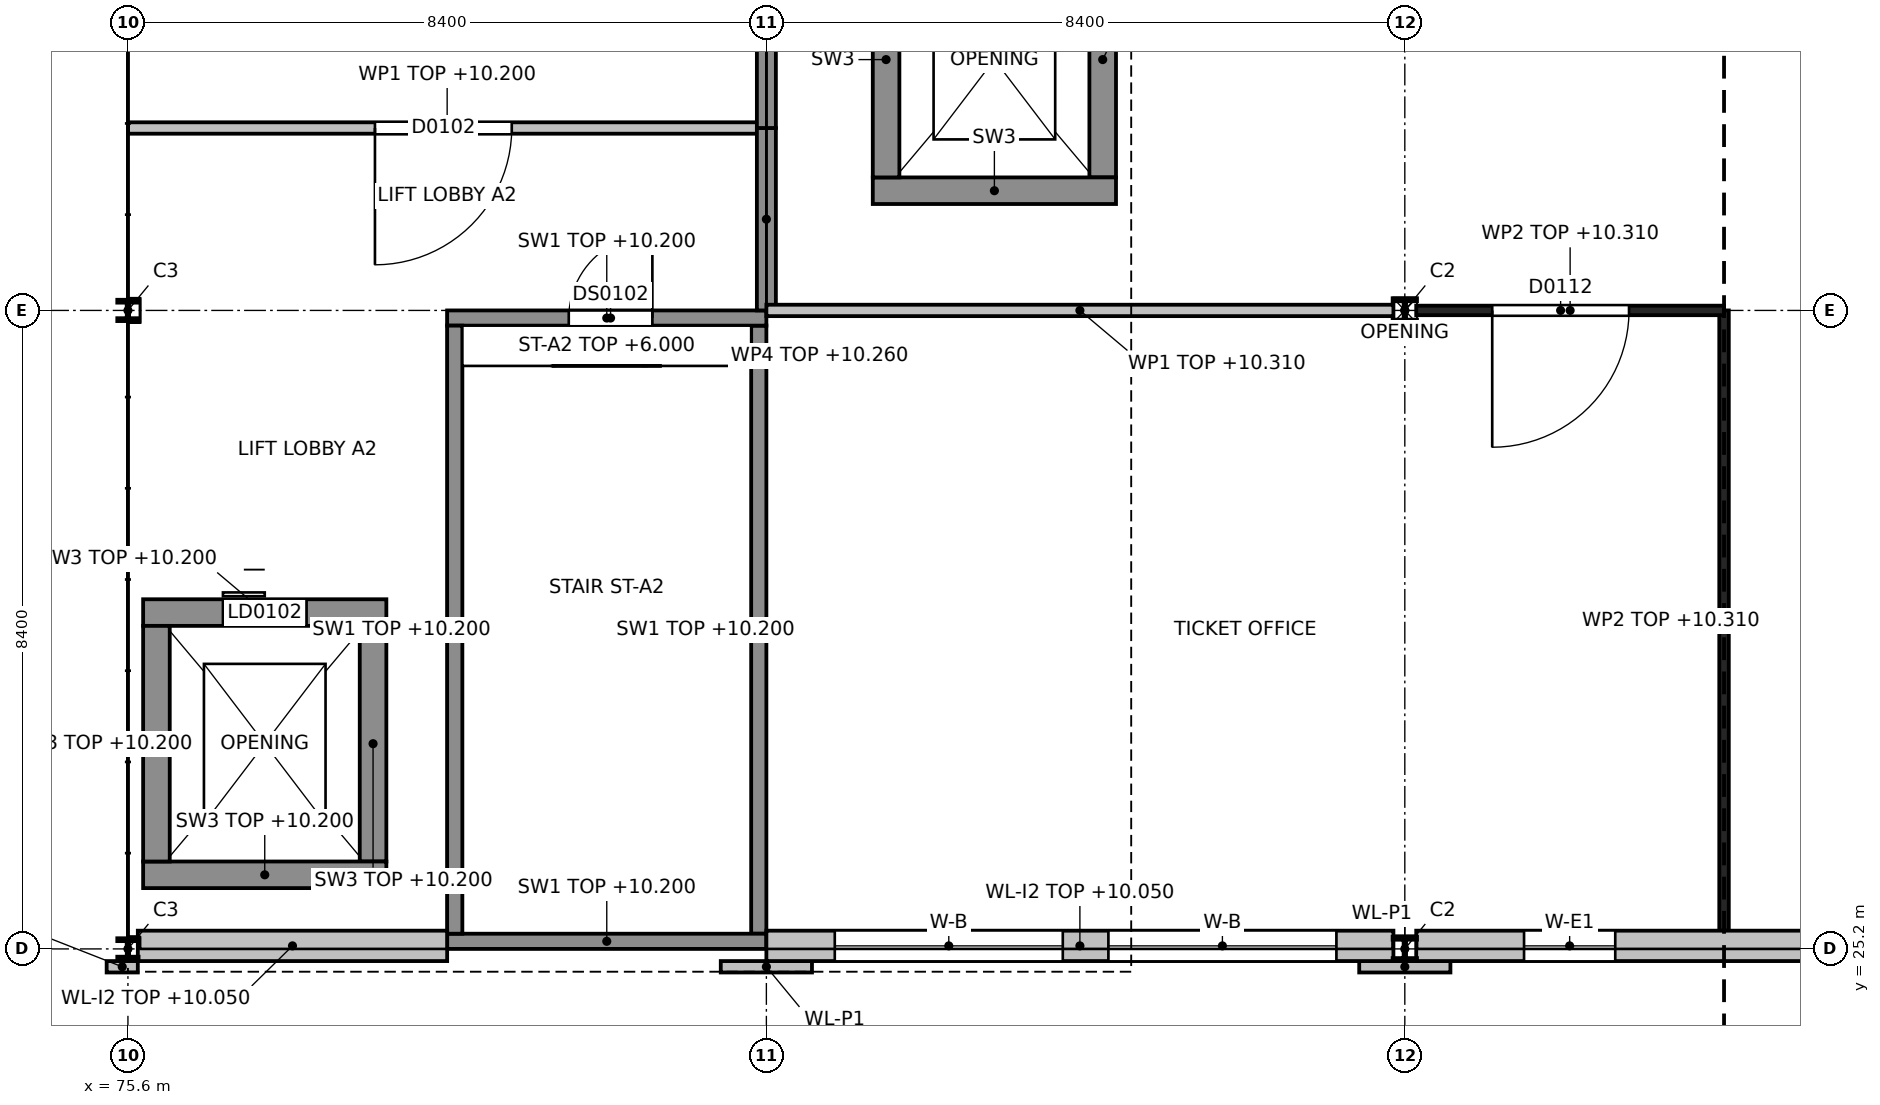
"""IFC4 building model, lengths in metres.
Left out: names, types, materials, properties, quantities, classifications, styles, units other than length and angle.
Written with IfcOpenShell. Run it as: python <this file> out.ifc"""

import sys

from ifc_helpers import new_model, si_unit, direction, frame, frame_2d, origin, origin_2d, place, context, subcontext, project, spatial, rectangle, i_section, extrude, element, fill, save


model = new_model("IFC4")
c1 = context("Model", 3, precision=1e-05, world=origin(), true_north=direction((0.0, 1.0)))
c2 = subcontext(c1, "Body", "Model", "MODEL_VIEW")
j1 = project(units=[si_unit("LENGTHUNIT", "METRE"), si_unit("PLANEANGLEUNIT", "RADIAN")], contexts=[c1])
p1 = place(None, origin())
s1 = spatial("IfcSite", under=j1, at=p1, CompositionType="ELEMENT")
p2 = place(p1, origin())
s2 = spatial("IfcBuilding", under=s1, at=p2, CompositionType="ELEMENT")
p3 = place(p2, frame((0.0, 0.0, 6.0)))
s3 = spatial("IfcBuildingStorey", under=s2, at=p3, CompositionType="ELEMENT", Elevation=6.0)
for number, where, z_axis, x_axis in (
    (1, (75.6, 25.2, 0.0), (0.0, 0.0, 1.0), (1.0, 0.0, 0.0)),
    (2, (75.6, 33.6, 0.0), (0.0, 0.0, 1.0), (1.0, 0.0, 0.0)),
):
    element("IfcColumn", number, at=place(p3, frame(where, z_axis=z_axis, x_axis=x_axis)), inside=s3, PredefinedType="COLUMN", context=c2, shape_type="SweptSolid", body=[
        extrude(i_section(OverallWidth=0.26, OverallDepth=0.26, WebThickness=0.01, FlangeThickness=0.018, at=origin_2d()), origin(), (0.0, 0.0, 1.0), 4.8),
    ])
for number, where, z_axis, x_axis in (
    (3, (92.4, 25.2, 0.0), (0.0, 0.0, 1.0), (1.0, 0.0, 0.0)),
    (4, (92.4, 33.6, 0.0), (0.0, 0.0, 1.0), (1.0, 0.0, 0.0)),
):
    element("IfcColumn", number, at=place(p3, frame(where, z_axis=z_axis, x_axis=x_axis)), inside=s3, PredefinedType="COLUMN", context=c2, shape_type="SweptSolid", body=[
        extrude(i_section(OverallWidth=0.3, OverallDepth=0.3, WebThickness=0.011, FlangeThickness=0.019, at=origin_2d()), origin(), (0.0, 0.0, 1.0), 4.8),
    ])
p4 = place(p3, frame((79.8, 25.3, 0.0), z_axis=(0.0, 0.0, 1.0), x_axis=(1.0, 0.0, 0.0)))
e5 = element("IfcWall", 5, at=p4, inside=s3, PredefinedType="SHEAR", context=c2, shape_type="SweptSolid", body=[
    extrude(rectangle(XDim=4.2, YDim=0.2, at=frame_2d((2.1, 0.0))), origin(), (0.0, 0.0, 1.0), 4.2),
])
p5 = place(p3, frame((79.8, 33.5, 0.0), z_axis=(0.0, 0.0, 1.0), x_axis=(1.0, 0.0, 0.0)))
e6 = element("IfcWall", 6, at=p5, inside=s3, PredefinedType="SHEAR", context=c2, shape_type="SweptSolid", body=[
    extrude(rectangle(XDim=4.2, YDim=0.2, at=frame_2d((2.1, 0.0))), origin(), (0.0, 0.0, 1.0), 4.2),
])
p6 = place(p5, frame((1.6, 0.0, 0.0)))
e7 = element("IfcOpeningElement", 7, at=p6, cuts=e6, PredefinedType="OPENING", context=c2, shape_type="SweptSolid", body=[
    extrude(rectangle(XDim=1.1, YDim=2.1, at=frame_2d((0.55, 1.05))), frame((0.0, 0.1, 0.0), z_axis=(0.0, -1.0, 0.0), x_axis=(1.0, 0.0, 0.0)), (0.0, 0.0, 1.0), 0.2),
])
for number, where, z_axis, x_axis in (
    (8, (79.9, 25.4, 0.0), (0.0, 0.0, 1.0), (0.0, 1.0, 0.0)),
    (9, (83.9, 25.4, 0.0), (0.0, 0.0, 1.0), (0.0, 1.0, 0.0)),
):
    element("IfcWall", number, at=place(p3, frame(where, z_axis=z_axis, x_axis=x_axis)), inside=s3, PredefinedType="SHEAR", context=c2, shape_type="SweptSolid", body=[
        extrude(rectangle(XDim=8.0, YDim=0.2, at=frame_2d((4.0, 0.0))), origin(), (0.0, 0.0, 1.0), 4.2),
    ])
p7 = place(p3, frame((75.8, 26.175, 0.0), z_axis=(0.0, 0.0, 1.0), x_axis=(1.0, 0.0, 0.0)))
e10 = element("IfcWall", 10, at=p7, inside=s3, PredefinedType="SHEAR", context=c2, shape_type="SweptSolid", body=[
    extrude(rectangle(XDim=3.2, YDim=0.35, at=frame_2d((1.6, 0.0))), origin(), (0.0, 0.0, 1.0), 4.2),
])
p8 = place(p3, frame((75.8, 29.625, 0.0), z_axis=(0.0, 0.0, 1.0), x_axis=(1.0, 0.0, 0.0)))
e11 = element("IfcWall", 11, at=p8, inside=s3, PredefinedType="SHEAR", context=c2, shape_type="SweptSolid", body=[
    extrude(rectangle(XDim=3.2, YDim=0.35, at=frame_2d((1.6, 0.0))), origin(), (0.0, 0.0, 1.0), 4.2),
])
p9 = place(p8, frame((1.05, 0.0, 0.0)))
e12 = element("IfcOpeningElement", 12, at=p9, cuts=e11, PredefinedType="OPENING", context=c2, shape_type="SweptSolid", body=[
    extrude(rectangle(XDim=1.1, YDim=2.1, at=frame_2d((0.55, 1.05))), frame((0.0, 0.175, 0.0), z_axis=(0.0, -1.0, 0.0), x_axis=(1.0, 0.0, 0.0)), (0.0, 0.0, 1.0), 0.35),
])
for number, where, z_axis, x_axis in (
    (13, (75.975, 26.35, 0.0), (0.0, 0.0, 1.0), (0.0, 1.0, 0.0)),
    (14, (78.825, 26.35, 0.0), (0.0, 0.0, 1.0), (0.0, 1.0, 0.0)),
):
    element("IfcWall", number, at=place(p3, frame(where, z_axis=z_axis, x_axis=x_axis)), inside=s3, PredefinedType="SHEAR", context=c2, shape_type="SweptSolid", body=[
        extrude(rectangle(XDim=3.1, YDim=0.35, at=frame_2d((1.55, 0.0))), origin(), (0.0, 0.0, 1.0), 4.2),
    ])
p10 = place(p3, frame((85.4, 35.175, 0.0), z_axis=(0.0, 0.0, 1.0), x_axis=(1.0, 0.0, 0.0)))
e15 = element("IfcWall", 15, at=p10, inside=s3, PredefinedType="SHEAR", context=c2, shape_type="SweptSolid", body=[
    extrude(rectangle(XDim=3.2, YDim=0.35, at=frame_2d((1.6, 0.0))), origin(), (0.0, 0.0, 1.0), 4.8),
])
for number, where, z_axis, x_axis in (
    (16, (85.575, 35.35, 0.0), (0.0, 0.0, 1.0), (0.0, 1.0, 0.0)),
    (17, (88.425, 35.35, 0.0), (0.0, 0.0, 1.0), (0.0, 1.0, 0.0)),
):
    element("IfcWall", number, at=place(p3, frame(where, z_axis=z_axis, x_axis=x_axis)), inside=s3, PredefinedType="SHEAR", context=c2, shape_type="SweptSolid", body=[
        extrude(rectangle(XDim=3.1, YDim=0.35, at=frame_2d((1.55, 0.0))), origin(), (0.0, 0.0, 1.0), 4.8),
    ])
p11 = place(p3, frame((75.73, 25.24, 0.0), z_axis=(0.0, 0.0, 1.0), x_axis=(1.0, 0.0, 0.0)))
e18 = element("IfcWall", 18, at=p11, inside=s3, PredefinedType="SOLIDWALL", context=c2, shape_type="SweptSolid", body=[
    extrude(rectangle(XDim=4.07, YDim=0.4, at=frame_2d((2.035, 0.0))), origin(), (0.0, 0.0, 1.0), 4.05),
])
p12 = place(p3, frame((84.0, 25.24, 0.0), z_axis=(0.0, 0.0, 1.0), x_axis=(1.0, 0.0, 0.0)))
e19 = element("IfcWall", 19, at=p12, inside=s3, PredefinedType="SOLIDWALL", context=c2, shape_type="SweptSolid", body=[
    extrude(rectangle(XDim=8.25, YDim=0.4, at=frame_2d((4.125, 0.0))), origin(), (0.0, 0.0, 1.0), 4.05),
])
p13 = place(p12, frame((0.9, 0.0, 0.9)))
e20 = element("IfcOpeningElement", 20, at=p13, cuts=e19, PredefinedType="OPENING", context=c2, shape_type="SweptSolid", body=[
    extrude(rectangle(XDim=3.0, YDim=3.0, at=frame_2d((1.5, 1.5))), frame((0.0, 0.2, 0.0), z_axis=(0.0, -1.0, 0.0), x_axis=(1.0, 0.0, 0.0)), (0.0, 0.0, 1.0), 0.4),
])
p14 = place(p12, frame((4.5, 0.0, 0.9)))
e21 = element("IfcOpeningElement", 21, at=p14, cuts=e19, PredefinedType="OPENING", context=c2, shape_type="SweptSolid", body=[
    extrude(rectangle(XDim=3.0, YDim=3.0, at=frame_2d((1.5, 1.5))), frame((0.0, 0.2, 0.0), z_axis=(0.0, -1.0, 0.0), x_axis=(1.0, 0.0, 0.0)), (0.0, 0.0, 1.0), 0.4),
])
p15 = place(p3, frame((92.55, 25.24, 0.0), z_axis=(0.0, 0.0, 1.0), x_axis=(1.0, 0.0, 0.0)))
e22 = element("IfcWall", 22, at=p15, inside=s3, PredefinedType="SOLIDWALL", context=c2, shape_type="SweptSolid", body=[
    extrude(rectangle(XDim=8.1, YDim=0.4, at=frame_2d((4.05, 0.0))), origin(), (0.0, 0.0, 1.0), 4.05),
])
p16 = place(p15, frame((1.419, 0.0, 0.9)))
e23 = element("IfcOpeningElement", 23, at=p16, cuts=e22, PredefinedType="OPENING", context=c2, shape_type="SweptSolid", body=[
    extrude(rectangle(XDim=1.2, YDim=3.0, at=frame_2d((0.6, 1.5))), frame((0.0, 0.2, 0.0), z_axis=(0.0, -1.0, 0.0), x_axis=(1.0, 0.0, 0.0)), (0.0, 0.0, 1.0), 0.4),
])
p17 = place(p15, frame((5.481, 0.0, 0.9)))
e24 = element("IfcOpeningElement", 24, at=p17, cuts=e22, PredefinedType="OPENING", context=c2, shape_type="SweptSolid", body=[
    extrude(rectangle(XDim=1.2, YDim=3.0, at=frame_2d((0.6, 1.5))), frame((0.0, 0.2, 0.0), z_axis=(0.0, -1.0, 0.0), x_axis=(1.0, 0.0, 0.0)), (0.0, 0.0, 1.0), 0.4),
])
p18 = place(p3, frame((75.32, 24.965, 0.0), z_axis=(0.0, 0.0, 1.0), x_axis=(1.0, 0.0, 0.0)))
e25 = element("IfcWall", 25, at=p18, inside=s3, PredefinedType="SOLIDWALL", context=c2, shape_type="SweptSolid", body=[
    extrude(rectangle(XDim=0.41, YDim=0.15, at=frame_2d((0.205, 0.0))), origin(), (0.0, 0.0, 1.0), 4.8),
])
p19 = place(p3, frame((83.4, 24.965, 0.0), z_axis=(0.0, 0.0, 1.0), x_axis=(1.0, 0.0, 0.0)))
e26 = element("IfcWall", 26, at=p19, inside=s3, PredefinedType="SOLIDWALL", context=c2, shape_type="SweptSolid", body=[
    extrude(rectangle(XDim=1.2, YDim=0.15, at=frame_2d((0.6, 0.0))), origin(), (0.0, 0.0, 1.0), 4.8),
])
p20 = place(p3, frame((91.8, 24.965, 0.0), z_axis=(0.0, 0.0, 1.0), x_axis=(1.0, 0.0, 0.0)))
e27 = element("IfcWall", 27, at=p20, inside=s3, PredefinedType="SOLIDWALL", context=c2, shape_type="SweptSolid", body=[
    extrude(rectangle(XDim=1.2, YDim=0.15, at=frame_2d((0.6, 0.0))), origin(), (0.0, 0.0, 1.0), 4.8),
])
p21 = place(p3, frame((75.6, 36.0, 0.0), z_axis=(0.0, 0.0, 1.0), x_axis=(1.0, 0.0, 0.0)))
e28 = element("IfcWall", 28, at=p21, inside=s3, PredefinedType="PARTITIONING", context=c2, shape_type="SweptSolid", body=[
    extrude(rectangle(XDim=8.4, YDim=0.15, at=frame_2d((4.2, 0.0))), origin(), (0.0, 0.0, 1.0), 4.2),
])
p22 = place(p21, frame((3.25, 0.0, 0.0)))
e29 = element("IfcOpeningElement", 29, at=p22, cuts=e28, PredefinedType="OPENING", context=c2, shape_type="SweptSolid", body=[
    extrude(rectangle(XDim=1.8, YDim=2.1, at=frame_2d((0.9, 1.05))), frame((0.0, 0.075, 0.0), z_axis=(0.0, -1.0, 0.0), x_axis=(1.0, 0.0, 0.0)), (0.0, 0.0, 1.0), 0.15),
])
p23 = place(p3, frame((84.0, 33.6, 0.0), z_axis=(0.0, 0.0, 1.0), x_axis=(0.0, 1.0, 0.0)))
e30 = element("IfcWall", 30, at=p23, inside=s3, PredefinedType="PARTITIONING", context=c2, shape_type="SweptSolid", body=[
    extrude(rectangle(XDim=2.4, YDim=0.25, at=frame_2d((1.2, 0.0))), origin(), (0.0, 0.0, 1.0), 4.26),
])
p24 = place(p3, frame((84.0, 36.0, 0.0), z_axis=(0.0, 0.0, 1.0), x_axis=(0.0, 1.0, 0.0)))
e31 = element("IfcWall", 31, at=p24, inside=s3, PredefinedType="PARTITIONING", context=c2, shape_type="SweptSolid", body=[
    extrude(rectangle(XDim=6.0, YDim=0.25, at=frame_2d((3.0, 0.0))), origin(), (0.0, 0.0, 1.0), 4.25),
])
p25 = place(p3, frame((96.6, 25.44, 0.0), z_axis=(0.0, 0.0, 1.0), x_axis=(0.0, 1.0, 0.0)))
e32 = element("IfcWall", 32, at=p25, inside=s3, PredefinedType="PARTITIONING", context=c2, shape_type="SweptSolid", body=[
    extrude(rectangle(XDim=8.16, YDim=0.125, at=frame_2d((4.08, 0.0))), origin(), (0.0, 0.0, 1.0), 4.31),
])
p26 = place(p3, frame((84.0, 33.6, 0.0), z_axis=(0.0, 0.0, 1.0), x_axis=(1.0, 0.0, 0.0)))
e33 = element("IfcWall", 33, at=p26, inside=s3, PredefinedType="PARTITIONING", context=c2, shape_type="SweptSolid", body=[
    extrude(rectangle(XDim=8.25, YDim=0.15, at=frame_2d((4.125, 0.0))), origin(), (0.0, 0.0, 1.0), 4.31),
])
p27 = place(p3, frame((92.55, 33.6, 0.0), z_axis=(0.0, 0.0, 1.0), x_axis=(1.0, 0.0, 0.0)))
e34 = element("IfcWall", 34, at=p27, inside=s3, PredefinedType="PARTITIONING", context=c2, shape_type="SweptSolid", body=[
    extrude(rectangle(XDim=4.05, YDim=0.125, at=frame_2d((2.025, 0.0))), origin(), (0.0, 0.0, 1.0), 4.31),
])
p28 = place(p27, frame((1.0, 0.0, 0.0)))
e35 = element("IfcOpeningElement", 35, at=p28, cuts=e34, PredefinedType="OPENING", context=c2, shape_type="SweptSolid", body=[
    extrude(rectangle(XDim=1.8, YDim=2.1, at=frame_2d((0.9, 1.05))), frame((0.0, 0.062, 0.0), z_axis=(0.0, -1.0, 0.0), x_axis=(1.0, 0.0, 0.0)), (0.0, 0.0, 1.0), 0.125),
])
p29 = place(p13, origin())
e36 = element("IfcWindow", 36, at=p29, inside=s3, PartitioningType="SINGLE_PANEL", PredefinedType="WINDOW", context=c2, shape_type="SweptSolid", body=[
    extrude(rectangle(XDim=3.0, YDim=3.0, at=frame_2d((1.5, 1.5))), frame((0.0, 0.03, 0.0), z_axis=(0.0, -1.0, 0.0), x_axis=(1.0, 0.0, 0.0)), (0.0, 0.0, 1.0), 0.06),
])
fill(e20, e36)
p30 = place(p14, origin())
e37 = element("IfcWindow", 37, at=p30, inside=s3, PartitioningType="SINGLE_PANEL", PredefinedType="WINDOW", context=c2, shape_type="SweptSolid", body=[
    extrude(rectangle(XDim=3.0, YDim=3.0, at=frame_2d((1.5, 1.5))), frame((0.0, 0.03, 0.0), z_axis=(0.0, -1.0, 0.0), x_axis=(1.0, 0.0, 0.0)), (0.0, 0.0, 1.0), 0.06),
])
fill(e21, e37)
p31 = place(p16, origin())
e38 = element("IfcWindow", 38, at=p31, inside=s3, PartitioningType="SINGLE_PANEL", PredefinedType="WINDOW", context=c2, shape_type="SweptSolid", body=[
    extrude(rectangle(XDim=1.2, YDim=3.0, at=frame_2d((0.6, 1.5))), frame((0.0, 0.03, 0.0), z_axis=(0.0, -1.0, 0.0), x_axis=(1.0, 0.0, 0.0)), (0.0, 0.0, 1.0), 0.06),
])
fill(e23, e38)
p32 = place(p22, origin())
e39 = element("IfcDoor", 39, at=p32, inside=s3, OperationType="DOUBLE_DOOR_DOUBLE_SWING", PredefinedType="DOOR", context=c2, shape_type="SweptSolid", body=[
    extrude(rectangle(XDim=1.8, YDim=2.1, at=frame_2d((0.9, 1.05))), frame((0.0, 0.025, 0.0), z_axis=(0.0, -1.0, 0.0), x_axis=(1.0, 0.0, 0.0)), (0.0, 0.0, 1.0), 0.05),
])
fill(e29, e39)
p33 = place(p28, origin())
e40 = element("IfcDoor", 40, at=p33, inside=s3, OperationType="DOUBLE_DOOR_DOUBLE_SWING", PredefinedType="DOOR", context=c2, shape_type="SweptSolid", body=[
    extrude(rectangle(XDim=1.8, YDim=2.1, at=frame_2d((0.9, 1.05))), frame((0.0, 0.025, 0.0), z_axis=(0.0, -1.0, 0.0), x_axis=(1.0, 0.0, 0.0)), (0.0, 0.0, 1.0), 0.05),
])
fill(e35, e40)
p34 = place(p6, origin())
e41 = element("IfcDoor", 41, at=p34, inside=s3, OperationType="SINGLE_SWING_RIGHT", PredefinedType="DOOR", context=c2, shape_type="SweptSolid", body=[
    extrude(rectangle(XDim=1.1, YDim=2.1, at=frame_2d((0.55, 1.05))), frame((0.0, 0.025, 0.0), z_axis=(0.0, -1.0, 0.0), x_axis=(1.0, 0.0, 0.0)), (0.0, 0.0, 1.0), 0.05),
])
fill(e7, e41)
p35 = place(p9, origin())
e42 = element("IfcDoor", 42, at=p35, inside=s3, OperationType="SLIDING_TO_RIGHT", PredefinedType="DOOR", context=c2, shape_type="SweptSolid", body=[
    extrude(rectangle(XDim=1.1, YDim=2.1, at=frame_2d((0.55, 1.05))), frame((0.0, 0.025, 0.0), z_axis=(0.0, -1.0, 0.0), x_axis=(1.0, 0.0, 0.0)), (0.0, 0.0, 1.0), 0.05),
])
fill(e12, e42)
save(model, sys.argv[1])
